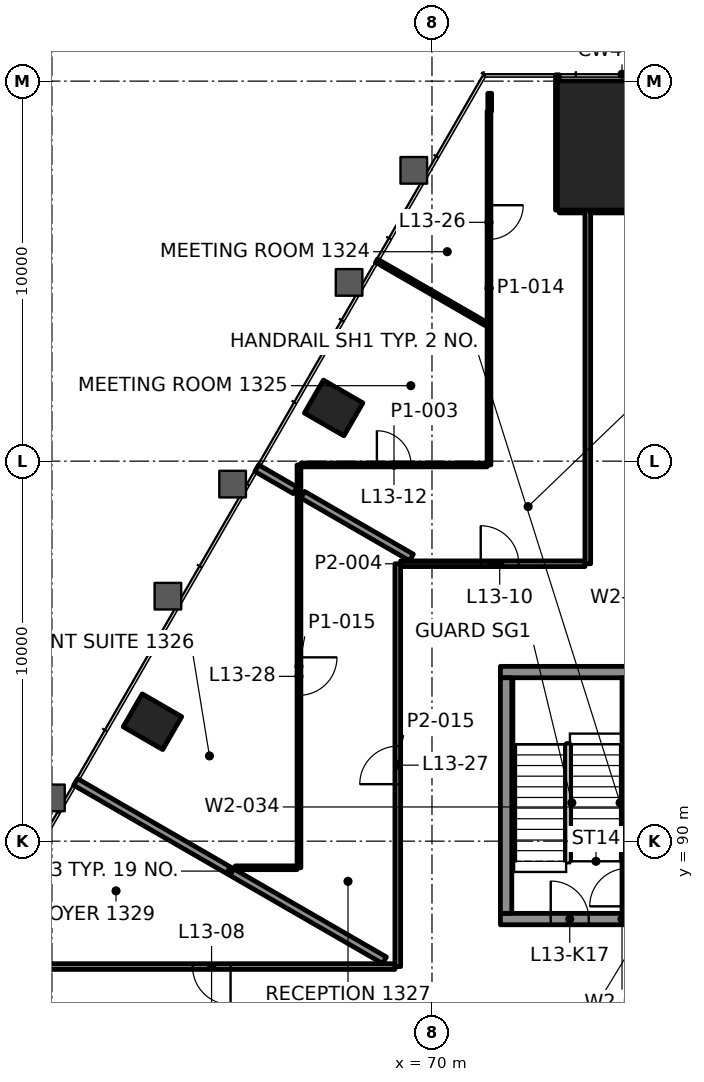
"""IFC4 building model, lengths in metres.
Left out: names, types, materials, properties, quantities, classifications, styles, units other than length and angle.
Written with IfcOpenShell. Run it as: python <this file> out.ifc"""

import sys

from ifc_helpers import new_model, si_unit, direction, frame, frame_2d, origin, origin_2d, place, context, subcontext, project, spatial, rectangle, extrude, element, fill, save


model = new_model("IFC4")
c1 = context("Model", 3, precision=1e-05, world=origin(), true_north=direction((0.0, 1.0)))
c2 = subcontext(c1, "Body", "Model", "MODEL_VIEW")
j1 = project(units=[si_unit("LENGTHUNIT", "METRE"), si_unit("PLANEANGLEUNIT", "RADIAN")], contexts=[c1])
p1 = place(None, origin())
s1 = spatial("IfcSite", under=j1, at=p1, CompositionType="ELEMENT")
p2 = place(p1, origin())
s2 = spatial("IfcBuilding", under=s1, at=p2, CompositionType="ELEMENT")
p3 = place(p2, frame((0.0, 0.0, 61.0)))
s3 = spatial("IfcBuildingStorey", under=s2, at=p3, CompositionType="ELEMENT", Elevation=61.0)
p4 = place(p3, frame((75.0, 108.307, 0.0), z_axis=(0.0, 0.0, 1.0), x_axis=(-1.0, 0.0, 0.0)))
e1 = element("IfcColumn", 1, at=p4, inside=s3, PredefinedType="COLUMN", context=c2, shape_type="SweptSolid", body=[
    extrude(rectangle(XDim=3.4, YDim=3.4, at=origin_2d()), origin(), (0.0, 0.0, 1.0), 4.2),
])
for number, where, z_axis, x_axis in (
    (2, (67.412, 101.4, -0.0), (0.0, 0.0, 1.0), (-0.5, -0.866, 0.0)),
    (3, (62.645, 93.143, -0.0), (0.0, 0.0, 1.0), (-0.5, -0.866, 0.0)),
):
    element("IfcColumn", number, at=place(p3, frame(where, z_axis=z_axis, x_axis=x_axis)), inside=s3, PredefinedType="COLUMN", context=c2, shape_type="SweptSolid", body=[
        extrude(rectangle(XDim=1.0, YDim=1.2, at=origin_2d()), origin(), (0.0, 0.0, 1.0), 4.2),
    ])
p5 = place(p3, frame((71.8, 87.95, 0.0), z_axis=(0.0, 0.0, 1.0), x_axis=(1.0, 0.0, 0.0)))
e4 = element("IfcWall", 4, at=p5, inside=s3, PredefinedType="SHEAR", context=c2, shape_type="SweptSolid", body=[
    extrude(rectangle(XDim=6.4, YDim=0.3, at=frame_2d((3.2, 0.0))), origin(), (0.0, 0.0, 1.0), 4.0),
])
p6 = place(p5, frame((1.325, 0.0, 0.0)))
e5 = element("IfcOpeningElement", 5, at=p6, cuts=e4, PredefinedType="OPENING", context=c2, shape_type="SweptSolid", body=[
    extrude(rectangle(XDim=1.0, YDim=2.1, at=frame_2d((0.5, 1.05))), frame((0.0, 0.16, 0.0), z_axis=(0.0, -1.0, 0.0), x_axis=(1.0, 0.0, 0.0)), (0.0, 0.0, 1.0), 0.32),
])
p7 = place(p5, frame((4.125, 0.0, 0.0)))
e6 = element("IfcOpeningElement", 6, at=p7, cuts=e4, PredefinedType="OPENING", context=c2, shape_type="SweptSolid", body=[
    extrude(rectangle(XDim=1.2, YDim=2.1, at=frame_2d((0.6, 1.05))), frame((0.0, 0.16, 0.0), z_axis=(0.0, -1.0, 0.0), x_axis=(1.0, 0.0, 0.0)), (0.0, 0.0, 1.0), 0.32),
])
p8 = place(p3, frame((71.8, 94.45, 0.0), z_axis=(0.0, 0.0, 1.0), x_axis=(1.0, 0.0, 0.0)))
e7 = element("IfcWall", 7, at=p8, inside=s3, PredefinedType="SHEAR", context=c2, shape_type="SweptSolid", body=[
    extrude(rectangle(XDim=6.4, YDim=0.3, at=frame_2d((3.2, 0.0))), origin(), (0.0, 0.0, 1.0), 4.0),
])
p9 = place(p3, frame((71.95, 88.1, 0.0), z_axis=(0.0, 0.0, 1.0), x_axis=(0.0, 1.0, 0.0)))
e8 = element("IfcWall", 8, at=p9, inside=s3, PredefinedType="SHEAR", context=c2, shape_type="SweptSolid", body=[
    extrude(rectangle(XDim=6.2, YDim=0.3, at=frame_2d((3.1, 0.0))), origin(), (0.0, 0.0, 1.0), 4.0),
])
p10 = place(p3, frame((75.15, 88.1, 0.0), z_axis=(0.0, 0.0, 1.0), x_axis=(0.0, 1.0, 0.0)))
e9 = element("IfcWall", 9, at=p10, inside=s3, PredefinedType="SHEAR", context=c2, shape_type="SweptSolid", body=[
    extrude(rectangle(XDim=6.2, YDim=0.3, at=frame_2d((3.1, 0.0))), origin(), (0.0, 0.0, 1.0), 4.0),
])
p11 = place(p10, frame((0.185, 0.0, 0.0)))
e10 = element("IfcOpeningElement", 10, at=p11, cuts=e9, PredefinedType="OPENING", context=c2, shape_type="SweptSolid", body=[
    extrude(rectangle(XDim=1.0, YDim=2.1, at=frame_2d((0.5, 1.05))), frame((0.0, 0.16, 0.0), z_axis=(0.0, -1.0, 0.0), x_axis=(1.0, 0.0, 0.0)), (0.0, 0.0, 1.0), 0.32),
])
p12 = place(p3, frame((69.025, 86.7, 0.0), z_axis=(0.0, 0.0, 1.0), x_axis=(-1.0, 0.0, 0.0)))
e11 = element("IfcWall", 11, at=p12, inside=s3, PredefinedType="PARTITIONING", context=c2, shape_type="SweptSolid", body=[
    extrude(rectangle(XDim=9.649, YDim=0.15, at=frame_2d((4.825, 0.0))), origin(), (0.0, 0.0, 1.0), 3.4),
])
p13 = place(p12, frame((4.325, 0.0, 0.0)))
e12 = element("IfcOpeningElement", 12, at=p13, cuts=e11, PredefinedType="OPENING", context=c2, shape_type="SweptSolid", body=[
    extrude(rectangle(XDim=1.0, YDim=2.1, at=frame_2d((0.5, 1.05))), frame((0.0, 0.085, 0.0), z_axis=(0.0, -1.0, 0.0), x_axis=(1.0, 0.0, 0.0)), (0.0, 0.0, 1.0), 0.17),
])
p14 = place(p3, frame((64.823, 89.3, 0.0), z_axis=(0.0, 0.0, 1.0), x_axis=(1.0, 0.0, 0.0)))
e13 = element("IfcWall", 13, at=p14, inside=s3, PredefinedType="PARTITIONING", context=c2, shape_type="SweptSolid", body=[
    extrude(rectangle(XDim=1.627, YDim=0.1, at=frame_2d((0.813, 0.0))), origin(), (0.0, 0.0, 1.0), 3.4),
])
p15 = place(p3, frame((69.175, 97.3, 0.0), z_axis=(0.0, 0.0, 1.0), x_axis=(1.0, 0.0, 0.0)))
e14 = element("IfcWall", 14, at=p15, inside=s3, PredefinedType="PARTITIONING", context=c2, shape_type="SweptSolid", body=[
    extrude(rectangle(XDim=4.85, YDim=0.15, at=frame_2d((2.425, 0.0))), origin(), (0.0, 0.0, 1.0), 3.4),
])
p16 = place(p15, frame((2.107, 0.0, 0.0)))
e15 = element("IfcOpeningElement", 15, at=p16, cuts=e14, PredefinedType="OPENING", context=c2, shape_type="SweptSolid", body=[
    extrude(rectangle(XDim=1.0, YDim=2.1, at=frame_2d((0.5, 1.05))), frame((0.0, 0.085, 0.0), z_axis=(0.0, -1.0, 0.0), x_axis=(1.0, 0.0, 0.0)), (0.0, 0.0, 1.0), 0.17),
])
p17 = place(p3, frame((66.551, 99.9, 0.0), z_axis=(0.0, 0.0, 1.0), x_axis=(1.0, 0.0, 0.0)))
e16 = element("IfcWall", 16, at=p17, inside=s3, PredefinedType="PARTITIONING", context=c2, shape_type="SweptSolid", body=[
    extrude(rectangle(XDim=4.899, YDim=0.1, at=frame_2d((2.45, 0.0))), origin(), (0.0, 0.0, 1.0), 3.165),
])
p18 = place(p17, frame((2.0, 0.0, 0.0)))
e17 = element("IfcOpeningElement", 17, at=p18, cuts=e16, PredefinedType="OPENING", context=c2, shape_type="SweptSolid", body=[
    extrude(rectangle(XDim=0.9, YDim=2.1, at=frame_2d((0.45, 1.05))), frame((0.0, 0.06, 0.0), z_axis=(0.0, -1.0, 0.0), x_axis=(1.0, 0.0, 0.0)), (0.0, 0.0, 1.0), 0.12),
])
p19 = place(p3, frame((73.351, 106.607, 0.0), z_axis=(0.0, 0.0, 1.0), x_axis=(1.0, 0.0, 0.0)))
e18 = element("IfcWall", 18, at=p19, inside=s3, PredefinedType="PARTITIONING", context=c2, shape_type="SweptSolid", body=[
    extrude(rectangle(XDim=0.674, YDim=0.15, at=frame_2d((0.337, 0.0))), origin(), (0.0, 0.0, 1.0), 3.4),
])
p20 = place(p3, frame((74.1, 97.3, 0.0), z_axis=(0.0, 0.0, 1.0), x_axis=(0.0, 1.0, 0.0)))
e19 = element("IfcWall", 19, at=p20, inside=s3, PredefinedType="PARTITIONING", context=c2, shape_type="SweptSolid", body=[
    extrude(rectangle(XDim=9.307, YDim=0.15, at=frame_2d((4.653, 0.0))), origin(), (0.0, 0.0, 1.0), 3.4),
])
p21 = place(p3, frame((73.3, 106.607, 0.0), z_axis=(0.0, 0.0, 1.0), x_axis=(0.0, 1.0, 0.0)))
e20 = element("IfcWall", 20, at=p21, inside=s3, PredefinedType="PARTITIONING", context=c2, shape_type="SweptSolid", body=[
    extrude(rectangle(XDim=3.56, YDim=0.1, at=frame_2d((1.78, 0.0))), origin(), (0.0, 0.0, 1.0), 3.4),
])
p22 = place(p3, frame((71.519, 109.207, 0.0), z_axis=(0.0, 0.0, 1.0), x_axis=(0.0, 1.0, 0.0)))
e21 = element("IfcWall", 21, at=p22, inside=s3, PredefinedType="PARTITIONING", context=c2, shape_type="SweptSolid", body=[
    extrude(rectangle(XDim=0.473, YDim=0.1, at=frame_2d((0.237, 0.0))), origin(), (0.0, 0.0, 1.0), 3.4),
])
p23 = place(p3, frame((71.5, 109.206, 0.0), z_axis=(0.0, 0.0, 1.0), x_axis=(0.0, -1.0, 0.0)))
e22 = element("IfcWall", 22, at=p23, inside=s3, PredefinedType="PARTITIONING", context=c2, shape_type="SweptSolid", body=[
    extrude(rectangle(XDim=9.306, YDim=0.1, at=frame_2d((4.653, 0.0))), origin(), (0.0, 0.0, 1.0), 3.4),
])
p24 = place(p23, frame((2.471, 0.0, 0.0)))
e23 = element("IfcOpeningElement", 23, at=p24, cuts=e22, PredefinedType="OPENING", context=c2, shape_type="SweptSolid", body=[
    extrude(rectangle(XDim=0.9, YDim=2.1, at=frame_2d((0.45, 1.05))), frame((0.0, 0.06, 0.0), z_axis=(0.0, -1.0, 0.0), x_axis=(1.0, 0.0, 0.0)), (0.0, 0.0, 1.0), 0.12),
])
p25 = place(p3, frame((69.1, 86.7, 0.0), z_axis=(0.0, 0.0, 1.0), x_axis=(0.0, 1.0, 0.0)))
e24 = element("IfcWall", 24, at=p25, inside=s3, PredefinedType="PARTITIONING", context=c2, shape_type="SweptSolid", body=[
    extrude(rectangle(XDim=10.6, YDim=0.15, at=frame_2d((5.3, 0.0))), origin(), (0.0, 0.0, 1.0), 3.4),
])
p26 = place(p25, frame((4.8, 0.0, 0.0)))
e25 = element("IfcOpeningElement", 25, at=p26, cuts=e24, PredefinedType="OPENING", context=c2, shape_type="SweptSolid", body=[
    extrude(rectangle(XDim=1.0, YDim=2.1, at=frame_2d((0.5, 1.05))), frame((0.0, 0.085, 0.0), z_axis=(0.0, -1.0, 0.0), x_axis=(1.0, 0.0, 0.0)), (0.0, 0.0, 1.0), 0.17),
])
p27 = place(p3, frame((66.5, 99.899, 0.0), z_axis=(0.0, 0.0, 1.0), x_axis=(0.0, -1.0, 0.0)))
e26 = element("IfcWall", 26, at=p27, inside=s3, PredefinedType="PARTITIONING", context=c2, shape_type="SweptSolid", body=[
    extrude(rectangle(XDim=10.599, YDim=0.1, at=frame_2d((5.3, 0.0))), origin(), (0.0, 0.0, 1.0), 3.165),
])
p28 = place(p27, frame((5.062, 0.0, 0.0)))
e27 = element("IfcOpeningElement", 27, at=p28, cuts=e26, PredefinedType="OPENING", context=c2, shape_type="SweptSolid", body=[
    extrude(rectangle(XDim=1.0, YDim=2.1, at=frame_2d((0.5, 1.05))), frame((0.0, 0.06, 0.0), z_axis=(0.0, -1.0, 0.0), x_axis=(1.0, 0.0, 0.0)), (0.0, 0.0, 1.0), 0.12),
])
p29 = place(p3, frame((71.424, 103.61, 0.0), z_axis=(0.0, 0.0, 1.0), x_axis=(-0.866004823592, 0.500035644245, 0.0)))
e28 = element("IfcWall", 28, at=p29, inside=s3, PredefinedType="PARTITIONING", context=c2, shape_type="SweptSolid", body=[
    extrude(rectangle(XDim=3.329, YDim=0.1, at=frame_2d((1.665, 0.0))), origin(), (0.0, 0.0, 1.0), 3.4),
])
p30 = place(p3, frame((69.46, 97.465, 0.0), z_axis=(0.0, 0.0, 1.0), x_axis=(-0.866027998537, 0.499995505729, 0.0)))
e29 = element("IfcWall", 29, at=p30, inside=s3, PredefinedType="PARTITIONING", context=c2, shape_type="SweptSolid", body=[
    extrude(rectangle(XDim=3.302, YDim=0.2, at=frame_2d((1.651, 0.0))), origin(), (0.0, 0.0, 1.0), 3.4),
])
p31 = place(p3, frame((68.751, 86.865, 0.0), z_axis=(0.0, 0.0, 1.0), x_axis=(-0.8660257632, 0.499999377474, 0.0)))
e30 = element("IfcWall", 30, at=p31, inside=s3, PredefinedType="PARTITIONING", context=c2, shape_type="SweptSolid", body=[
    extrude(rectangle(XDim=9.387, YDim=0.2, at=frame_2d((4.693, 0.0))), origin(), (0.0, 0.0, 1.0), 3.165),
])
p32 = place(p3, frame((74.175, 106.607, 0.0), z_axis=(0.0, 0.0, 1.0), x_axis=(1.0, 0.0, 0.0)))
e31 = element("IfcWall", 31, at=p32, inside=s3, PredefinedType="PARTITIONING", context=c2, shape_type="SweptSolid", body=[
    extrude(rectangle(XDim=1.649, YDim=0.15, at=frame_2d((0.825, 0.0))), origin(), (0.0, 0.0, 1.0), 3.397),
])
p33 = place(p3, frame((66.4, 99.231, 0.0), z_axis=(0.0, 0.0, 1.0), x_axis=(-0.86600796803, 0.500030198396, 0.0)))
e32 = element("IfcWall", 32, at=p33, inside=s3, PredefinedType="PARTITIONING", context=c2, shape_type="SweptSolid", body=[
    extrude(rectangle(XDim=1.167, YDim=0.2, at=frame_2d((0.584, 0.0))), origin(), (0.0, 0.0, 1.0), 3.165),
])
p34 = place(p13, origin())
e33 = element("IfcDoor", 33, at=p34, inside=s3, OperationType="SINGLE_SWING_LEFT", PredefinedType="DOOR", context=c2, shape_type="SweptSolid", body=[
    extrude(rectangle(XDim=1.0, YDim=2.1, at=frame_2d((0.5, 1.05))), frame((0.0, 0.025, 0.0), z_axis=(0.0, -1.0, 0.0), x_axis=(1.0, 0.0, 0.0)), (0.0, 0.0, 1.0), 0.05),
])
fill(e12, e33)
p35 = place(p16, origin())
e34 = element("IfcDoor", 34, at=p35, inside=s3, OperationType="SINGLE_SWING_RIGHT", PredefinedType="DOOR", context=c2, shape_type="SweptSolid", body=[
    extrude(rectangle(XDim=1.0, YDim=2.1, at=frame_2d((0.5, 1.05))), frame((0.0, 0.025, 0.0), z_axis=(0.0, -1.0, 0.0), x_axis=(1.0, 0.0, 0.0)), (0.0, 0.0, 1.0), 0.05),
])
fill(e15, e34)
p36 = place(p18, origin())
e35 = element("IfcDoor", 35, at=p36, inside=s3, OperationType="SINGLE_SWING_RIGHT", PredefinedType="DOOR", context=c2, shape_type="SweptSolid", body=[
    extrude(rectangle(XDim=0.9, YDim=2.1, at=frame_2d((0.45, 1.05))), frame((0.0, 0.025, 0.0), z_axis=(0.0, -1.0, 0.0), x_axis=(1.0, 0.0, 0.0)), (0.0, 0.0, 1.0), 0.05),
])
fill(e17, e35)
p37 = place(p24, origin())
e36 = element("IfcDoor", 36, at=p37, inside=s3, OperationType="SINGLE_SWING_RIGHT", PredefinedType="DOOR", context=c2, shape_type="SweptSolid", body=[
    extrude(rectangle(XDim=0.9, YDim=2.1, at=frame_2d((0.45, 1.05))), frame((0.0, 0.025, 0.0), z_axis=(0.0, -1.0, 0.0), x_axis=(1.0, 0.0, 0.0)), (0.0, 0.0, 1.0), 0.05),
])
fill(e23, e36)
p38 = place(p26, origin())
e37 = element("IfcDoor", 37, at=p38, inside=s3, OperationType="SINGLE_SWING_RIGHT", PredefinedType="DOOR", context=c2, shape_type="SweptSolid", body=[
    extrude(rectangle(XDim=1.0, YDim=2.1, at=frame_2d((0.5, 1.05))), frame((0.0, 0.025, 0.0), z_axis=(0.0, -1.0, 0.0), x_axis=(1.0, 0.0, 0.0)), (0.0, 0.0, 1.0), 0.05),
])
fill(e25, e37)
p39 = place(p28, origin())
e38 = element("IfcDoor", 38, at=p39, inside=s3, OperationType="SINGLE_SWING_RIGHT", PredefinedType="DOOR", context=c2, shape_type="SweptSolid", body=[
    extrude(rectangle(XDim=1.0, YDim=2.1, at=frame_2d((0.5, 1.05))), frame((0.0, 0.025, 0.0), z_axis=(0.0, -1.0, 0.0), x_axis=(1.0, 0.0, 0.0)), (0.0, 0.0, 1.0), 0.05),
])
fill(e27, e38)
p40 = place(p6, origin())
e39 = element("IfcDoor", 39, at=p40, inside=s3, OperationType="SINGLE_SWING_RIGHT", PredefinedType="DOOR", context=c2, shape_type="SweptSolid", body=[
    extrude(rectangle(XDim=1.0, YDim=2.1, at=frame_2d((0.5, 1.05))), frame((0.0, 0.025, 0.0), z_axis=(0.0, -1.0, 0.0), x_axis=(1.0, 0.0, 0.0)), (0.0, 0.0, 1.0), 0.05),
])
fill(e5, e39)
save(model, sys.argv[1])
